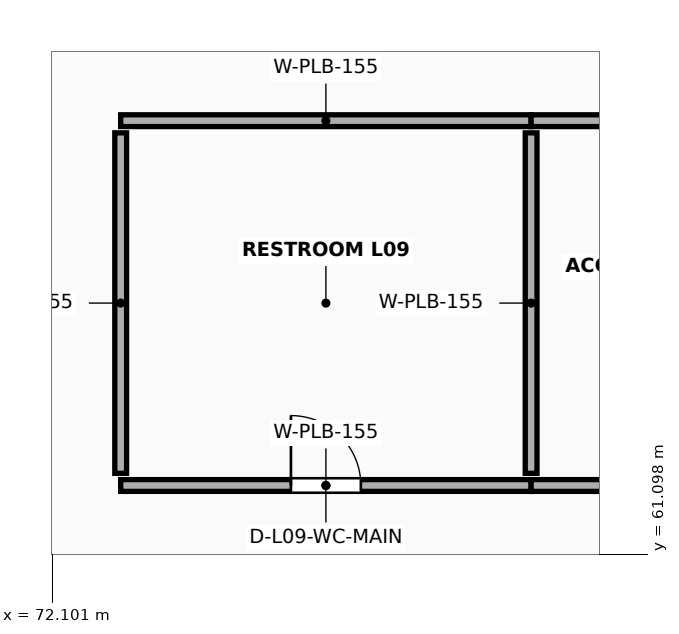
"""IFC4 building model, lengths in metres.
Left out: names, types, materials, properties, quantities, classifications, styles, units other than length and angle.
Written with IfcOpenShell. Run it as: python <this file> out.ifc"""

import sys

from ifc_helpers import new_model, si_unit, direction, frame, frame_2d, origin, place, context, subcontext, project, spatial, rectangle, extrude, element, fill, save


model = new_model("IFC4")
c1 = context("Model", 3, precision=1e-05, world=origin(), true_north=direction((0.0, 1.0)))
c2 = subcontext(c1, "Body", "Model", "MODEL_VIEW")
j1 = project(units=[si_unit("LENGTHUNIT", "METRE"), si_unit("PLANEANGLEUNIT", "RADIAN")], contexts=[c1])
p1 = place(None, origin())
s1 = spatial("IfcSite", under=j1, at=p1, CompositionType="ELEMENT")
p2 = place(p1, origin())
s2 = spatial("IfcBuilding", under=s1, at=p2, CompositionType="ELEMENT")
p3 = place(p2, frame((0.0, 0.0, 37.6)))
s3 = spatial("IfcBuildingStorey", under=s2, at=p3, CompositionType="ELEMENT", Elevation=37.6)
p4 = place(p3, frame((73.0, 62.0, 0.0), z_axis=(0.0, 0.0, 1.0), x_axis=(1.0, 0.0, 0.0)))
e1 = element("IfcWall", 1, at=p4, inside=s3, PredefinedType="PLUMBINGWALL", context=c2, shape_type="SweptSolid", body=[
    extrude(rectangle(XDim=5.4, YDim=0.155, at=frame_2d((2.7, 0.0))), origin(), (0.0, 0.0, 1.0), 2.88),
])
p5 = place(p4, frame((2.24, 0.0, 0.0)))
e2 = element("IfcOpeningElement", 2, at=p5, cuts=e1, PredefinedType="OPENING", context=c2, shape_type="SweptSolid", body=[
    extrude(rectangle(XDim=0.92, YDim=2.1, at=frame_2d((0.46, 1.05))), frame((0.0, 0.093, 0.0), z_axis=(0.0, -1.0, 0.0), x_axis=(1.0, 0.0, 0.0)), (0.0, 0.0, 1.0), 0.185),
])
p6 = place(p3, frame((73.0, 66.8, 0.0), z_axis=(0.0, 0.0, 1.0), x_axis=(1.0, 0.0, 0.0)))
e3 = element("IfcWall", 3, at=p6, inside=s3, PredefinedType="PLUMBINGWALL", context=c2, shape_type="SweptSolid", body=[
    extrude(rectangle(XDim=5.4, YDim=0.155, at=frame_2d((2.7, 0.0))), origin(), (0.0, 0.0, 1.0), 2.88),
])
for number, where, z_axis, x_axis in (
    (4, (73.0, 62.16, 0.0), (0.0, 0.0, 1.0), (0.0, 1.0, 0.0)),
    (5, (78.4, 62.16, 0.0), (0.0, 0.0, 1.0), (0.0, 1.0, 0.0)),
):
    element("IfcWall", number, at=place(p3, frame(where, z_axis=z_axis, x_axis=x_axis)), inside=s3, PredefinedType="PLUMBINGWALL", context=c2, shape_type="SweptSolid", body=[
        extrude(rectangle(XDim=4.48, YDim=0.155, at=frame_2d((2.24, 0.0))), origin(), (0.0, 0.0, 1.0), 2.88),
    ])
p7 = place(p3, frame((78.4, 62.0, 0.0), z_axis=(0.0, 0.0, 1.0), x_axis=(1.0, 0.0, 0.0)))
e6 = element("IfcWall", 6, at=p7, inside=s3, PredefinedType="PLUMBINGWALL", context=c2, shape_type="SweptSolid", body=[
    extrude(rectangle(XDim=3.8, YDim=0.155, at=frame_2d((1.9, 0.0))), origin(), (0.0, 0.0, 1.0), 2.88),
])
p8 = place(p7, frame((1.425, 0.0, 0.0)))
e7 = element("IfcOpeningElement", 7, at=p8, cuts=e6, PredefinedType="OPENING", context=c2, shape_type="SweptSolid", body=[
    extrude(rectangle(XDim=0.95, YDim=2.13, at=frame_2d((0.475, 1.065))), frame((0.0, 0.093, 0.0), z_axis=(0.0, -1.0, 0.0), x_axis=(1.0, 0.0, 0.0)), (0.0, 0.0, 1.0), 0.185),
])
p9 = place(p3, frame((78.4, 66.8, 0.0), z_axis=(0.0, 0.0, 1.0), x_axis=(1.0, 0.0, 0.0)))
e8 = element("IfcWall", 8, at=p9, inside=s3, PredefinedType="PLUMBINGWALL", context=c2, shape_type="SweptSolid", body=[
    extrude(rectangle(XDim=3.8, YDim=0.155, at=frame_2d((1.9, 0.0))), origin(), (0.0, 0.0, 1.0), 2.88),
])
p10 = place(p5, origin())
e9 = element("IfcDoor", 9, at=p10, inside=s3, OperationType="SINGLE_SWING_LEFT", PredefinedType="DOOR", context=c2, shape_type="SweptSolid", body=[
    extrude(rectangle(XDim=0.92, YDim=2.1, at=frame_2d((0.46, 1.05))), frame((0.0, 0.025, 0.0), z_axis=(0.0, -1.0, 0.0), x_axis=(1.0, 0.0, 0.0)), (0.0, 0.0, 1.0), 0.05),
])
fill(e2, e9)
save(model, sys.argv[1])
